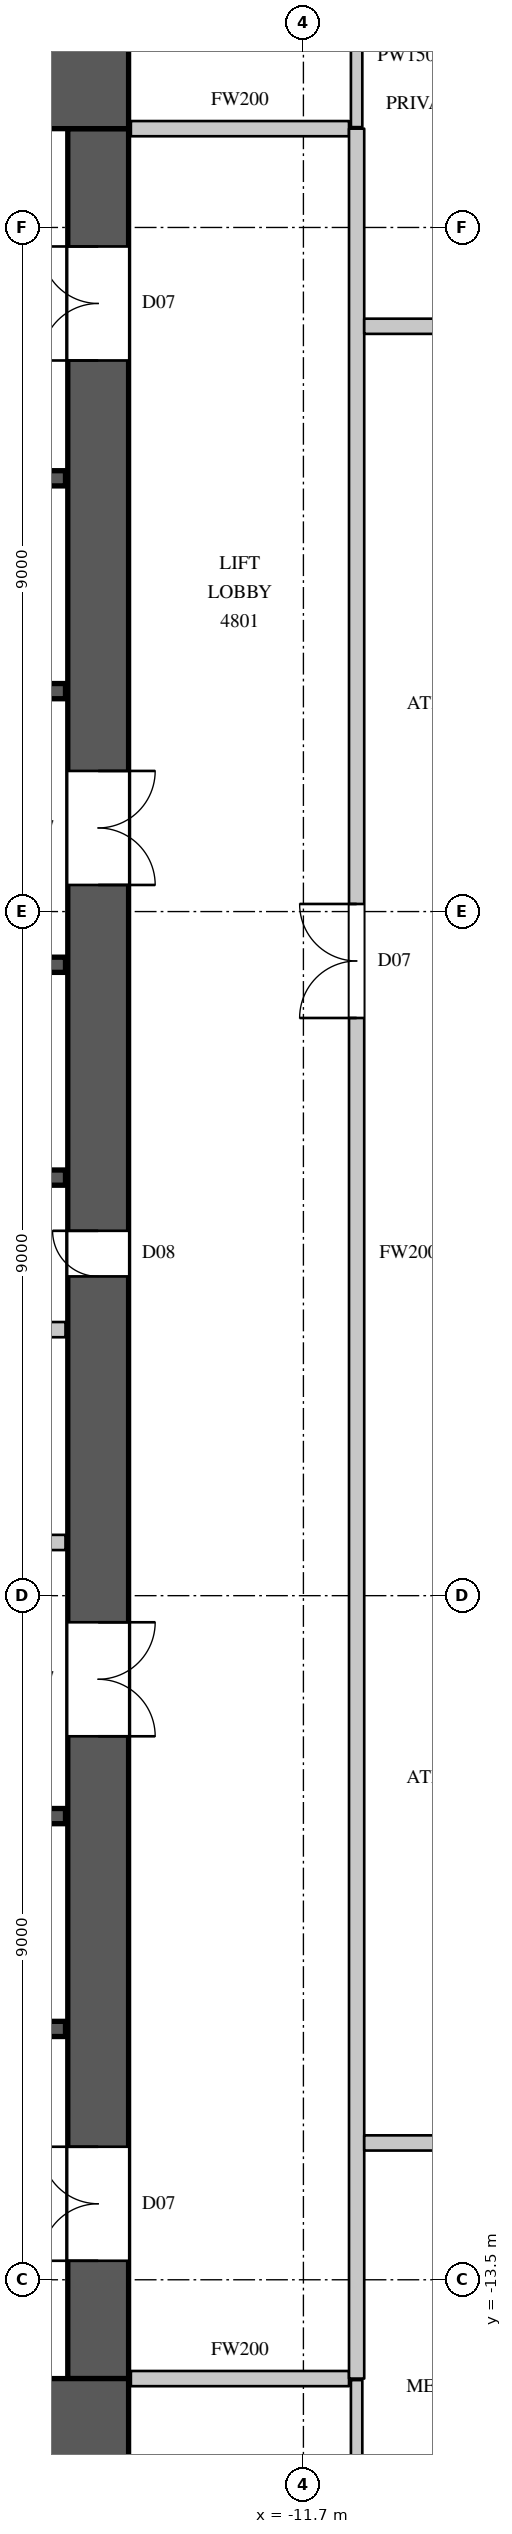
"""IFC4 building model, lengths in metres.
Left out: names, types, materials, properties, quantities, classifications, styles, units other than length and angle.
Written with IfcOpenShell. Run it as: python <this file> out.ifc"""

import sys

from ifc_helpers import new_model, si_unit, direction, frame, frame_2d, origin, place, context, subcontext, project, spatial, rectangle, extrude, element, fill, save


model = new_model("IFC4")
c1 = context("Model", 3, precision=1e-05, world=origin(), true_north=direction((0.0, 1.0)))
c2 = subcontext(c1, "Body", "Model", "MODEL_VIEW")
j1 = project(units=[si_unit("LENGTHUNIT", "METRE"), si_unit("PLANEANGLEUNIT", "RADIAN")], contexts=[c1])
p1 = place(None, origin())
s1 = spatial("IfcSite", under=j1, at=p1, CompositionType="ELEMENT")
p2 = place(p1, origin())
s2 = spatial("IfcBuilding", under=s1, at=p2, CompositionType="ELEMENT")
p3 = place(p2, frame((0.0, 0.0, 217.9)))
s3 = spatial("IfcBuildingStorey", under=s2, at=p3, CompositionType="ELEMENT", Elevation=217.9)
for number, where, z_axis, x_axis in (
    (1, (-30.0, 15.4, 0.0), (0.0, 0.0, 1.0), (1.0, 0.0, 0.0)),
    (2, (-30.0, -15.4, 0.0), (0.0, 0.0, 1.0), (1.0, 0.0, 0.0)),
):
    element("IfcWall", number, at=place(p3, frame(where, z_axis=z_axis, x_axis=x_axis)), inside=s3, PredefinedType="SHEAR", context=c2, shape_type="SweptSolid", body=[
        extrude(rectangle(XDim=16.0, YDim=1.2, at=frame_2d((8.0, 0.0))), origin(), (0.0, 0.0, 1.0), 4.1),
    ])
p4 = place(p3, frame((-14.4, -14.8, 0.0), z_axis=(0.0, 0.0, 1.0), x_axis=(0.0, 1.0, 0.0)))
e3 = element("IfcWall", 3, at=p4, inside=s3, PredefinedType="SHEAR", context=c2, shape_type="SweptSolid", body=[
    extrude(rectangle(XDim=29.6, YDim=0.8, at=frame_2d((14.8, 0.0))), origin(), (0.0, 0.0, 1.0), 4.1),
])
p5 = place(p4, frame((1.55, 0.0, 0.0)))
e4 = element("IfcOpeningElement", 4, at=p5, cuts=e3, PredefinedType="OPENING", context=c2, shape_type="SweptSolid", body=[
    extrude(rectangle(XDim=1.5, YDim=2.4, at=frame_2d((0.75, 1.2))), frame((0.0, 0.41, 0.0), z_axis=(0.0, -1.0, 0.0), x_axis=(1.0, 0.0, 0.0)), (0.0, 0.0, 1.0), 0.82),
])
p6 = place(p4, frame((26.55, 0.0, 0.0)))
e5 = element("IfcOpeningElement", 5, at=p6, cuts=e3, PredefinedType="OPENING", context=c2, shape_type="SweptSolid", body=[
    extrude(rectangle(XDim=1.5, YDim=2.4, at=frame_2d((0.75, 1.2))), frame((0.0, 0.41, 0.0), z_axis=(0.0, -1.0, 0.0), x_axis=(1.0, 0.0, 0.0)), (0.0, 0.0, 1.0), 0.82),
])
p7 = place(p4, frame((8.45, 0.0, 0.0)))
e6 = element("IfcOpeningElement", 6, at=p7, cuts=e3, PredefinedType="OPENING", context=c2, shape_type="SweptSolid", body=[
    extrude(rectangle(XDim=1.5, YDim=2.4, at=frame_2d((0.75, 1.2))), frame((0.0, 0.41, 0.0), z_axis=(0.0, -1.0, 0.0), x_axis=(1.0, 0.0, 0.0)), (0.0, 0.0, 1.0), 0.82),
])
p8 = place(p4, frame((19.65, 0.0, 0.0)))
e7 = element("IfcOpeningElement", 7, at=p8, cuts=e3, PredefinedType="OPENING", context=c2, shape_type="SweptSolid", body=[
    extrude(rectangle(XDim=1.5, YDim=2.4, at=frame_2d((0.75, 1.2))), frame((0.0, 0.41, 0.0), z_axis=(0.0, -1.0, 0.0), x_axis=(1.0, 0.0, 0.0)), (0.0, 0.0, 1.0), 0.82),
])
p9 = place(p4, frame((14.5, 0.0, 0.0)))
e8 = element("IfcOpeningElement", 8, at=p9, cuts=e3, PredefinedType="OPENING", context=c2, shape_type="SweptSolid", body=[
    extrude(rectangle(XDim=0.6, YDim=2.0, at=frame_2d((0.3, 1.0))), frame((0.0, 0.41, 0.0), z_axis=(0.0, -1.0, 0.0), x_axis=(1.0, 0.0, 0.0)), (0.0, 0.0, 1.0), 0.82),
])
p10 = place(p3, frame((-29.17, -3.8, 0.0), z_axis=(0.0, 0.0, 1.0), x_axis=(1.0, 0.0, 0.0)))
e9 = element("IfcWall", 9, at=p10, inside=s3, PredefinedType="PARTITIONING", context=c2, shape_type="SweptSolid", body=[
    extrude(rectangle(XDim=14.34, YDim=0.2, at=frame_2d((7.17, 0.0))), origin(), (0.0, 0.0, 1.0), 3.8),
])
p11 = place(p10, frame((3.6, 0.0, 0.0)))
e10 = element("IfcOpeningElement", 10, at=p11, cuts=e9, PredefinedType="OPENING", context=c2, shape_type="SweptSolid", body=[
    extrude(rectangle(XDim=0.9, YDim=2.2, at=frame_2d((0.45, 1.1))), frame((0.0, 0.11, 0.0), z_axis=(0.0, -1.0, 0.0), x_axis=(1.0, 0.0, 0.0)), (0.0, 0.0, 1.0), 0.22),
])
p12 = place(p10, frame((10.6, 0.0, 0.0)))
e11 = element("IfcOpeningElement", 11, at=p12, cuts=e9, PredefinedType="OPENING", context=c2, shape_type="SweptSolid", body=[
    extrude(rectangle(XDim=0.9, YDim=2.2, at=frame_2d((0.45, 1.1))), frame((0.0, 0.11, 0.0), z_axis=(0.0, -1.0, 0.0), x_axis=(1.0, 0.0, 0.0)), (0.0, 0.0, 1.0), 0.22),
])
for number, where, z_axis, x_axis in (
    (12, (-13.97, -14.8, 0.0), (0.0, 0.0, 1.0), (1.0, 0.0, 0.0)),
    (13, (-13.97, 14.8, 0.0), (0.0, 0.0, 1.0), (1.0, 0.0, 0.0)),
):
    element("IfcWall", number, at=place(p3, frame(where, z_axis=z_axis, x_axis=x_axis)), inside=s3, PredefinedType="PARTITIONING", context=c2, shape_type="SweptSolid", body=[
        extrude(rectangle(XDim=2.87, YDim=0.2, at=frame_2d((1.435, 0.0))), origin(), (0.0, 0.0, 1.0), 3.8),
    ])
p13 = place(p3, frame((-11.0, -14.8, 0.0), z_axis=(0.0, 0.0, 1.0), x_axis=(0.0, 1.0, 0.0)))
e14 = element("IfcWall", 14, at=p13, inside=s3, PredefinedType="PARTITIONING", context=c2, shape_type="SweptSolid", body=[
    extrude(rectangle(XDim=29.6, YDim=0.2, at=frame_2d((14.8, 0.0))), origin(), (0.0, 0.0, 1.0), 3.8),
])
p14 = place(p13, frame((17.9, 0.0, 0.0)))
e15 = element("IfcOpeningElement", 15, at=p14, cuts=e14, PredefinedType="OPENING", context=c2, shape_type="SweptSolid", body=[
    extrude(rectangle(XDim=1.5, YDim=2.4, at=frame_2d((0.75, 1.2))), frame((0.0, 0.11, 0.0), z_axis=(0.0, -1.0, 0.0), x_axis=(1.0, 0.0, 0.0)), (0.0, 0.0, 1.0), 0.22),
])
p15 = place(p3, frame((-10.9, -11.7, 0.0), z_axis=(0.0, 0.0, 1.0), x_axis=(1.0, 0.0, 0.0)))
e16 = element("IfcWall", 16, at=p15, inside=s3, PredefinedType="PARTITIONING", context=c2, shape_type="SweptSolid", body=[
    extrude(rectangle(XDim=21.5, YDim=0.2, at=frame_2d((10.75, 0.0))), origin(), (0.0, 0.0, 1.0), 3.8),
])
p16 = place(p15, frame((13.2, 0.0, 0.0)))
e17 = element("IfcOpeningElement", 17, at=p16, cuts=e16, PredefinedType="OPENING", context=c2, shape_type="SweptSolid", body=[
    extrude(rectangle(XDim=0.9, YDim=2.2, at=frame_2d((0.45, 1.1))), frame((0.0, 0.11, 0.0), z_axis=(0.0, -1.0, 0.0), x_axis=(1.0, 0.0, 0.0)), (0.0, 0.0, 1.0), 0.22),
])
p17 = place(p15, frame((16.5, 0.0, 0.0)))
e18 = element("IfcOpeningElement", 18, at=p17, cuts=e16, PredefinedType="OPENING", context=c2, shape_type="SweptSolid", body=[
    extrude(rectangle(XDim=0.9, YDim=2.2, at=frame_2d((0.45, 1.1))), frame((0.0, 0.11, 0.0), z_axis=(0.0, -1.0, 0.0), x_axis=(1.0, 0.0, 0.0)), (0.0, 0.0, 1.0), 0.22),
])
p18 = place(p15, frame((20.25, 0.0, 0.0)))
e19 = element("IfcOpeningElement", 19, at=p18, cuts=e16, PredefinedType="OPENING", context=c2, shape_type="SweptSolid", body=[
    extrude(rectangle(XDim=0.9, YDim=2.2, at=frame_2d((0.45, 1.1))), frame((0.0, 0.11, 0.0), z_axis=(0.0, -1.0, 0.0), x_axis=(1.0, 0.0, 0.0)), (0.0, 0.0, 1.0), 0.22),
])
p19 = place(p15, frame((1.25, 0.0, 0.0)))
e20 = element("IfcOpeningElement", 20, at=p19, cuts=e16, PredefinedType="OPENING", context=c2, shape_type="SweptSolid", body=[
    extrude(rectangle(XDim=1.1, YDim=2.4, at=frame_2d((0.55, 1.2))), frame((0.0, 0.11, 0.0), z_axis=(0.0, -1.0, 0.0), x_axis=(1.0, 0.0, 0.0)), (0.0, 0.0, 1.0), 0.22),
])
p20 = place(p15, frame((7.3, 0.0, 0.0)))
e21 = element("IfcOpeningElement", 21, at=p20, cuts=e16, PredefinedType="OPENING", context=c2, shape_type="SweptSolid", body=[
    extrude(rectangle(XDim=1.1, YDim=2.4, at=frame_2d((0.55, 1.2))), frame((0.0, 0.11, 0.0), z_axis=(0.0, -1.0, 0.0), x_axis=(1.0, 0.0, 0.0)), (0.0, 0.0, 1.0), 0.22),
])
p21 = place(p3, frame((-10.9, 12.2, 0.0), z_axis=(0.0, 0.0, 1.0), x_axis=(1.0, 0.0, 0.0)))
e22 = element("IfcWall", 22, at=p21, inside=s3, PredefinedType="PARTITIONING", context=c2, shape_type="SweptSolid", body=[
    extrude(rectangle(XDim=3.704, YDim=0.2, at=frame_2d((1.852, 0.0))), origin(), (0.0, 0.0, 1.0), 3.8),
])
p22 = place(p21, frame((1.7, 0.0, 0.0)))
e23 = element("IfcOpeningElement", 23, at=p22, cuts=e22, PredefinedType="OPENING", context=c2, shape_type="SweptSolid", body=[
    extrude(rectangle(XDim=1.1, YDim=2.4, at=frame_2d((0.55, 1.2))), frame((0.0, 0.11, 0.0), z_axis=(0.0, -1.0, 0.0), x_axis=(1.0, 0.0, 0.0)), (0.0, 0.0, 1.0), 0.22),
])
for number, where, z_axis, x_axis in (
    (24, (-11.0, -16.7, 0.0), (0.0, 0.0, 1.0), (0.0, 1.0, 0.0)),
    (25, (-11.0, 14.82, 0.0), (0.0, 0.0, 1.0), (0.0, 1.0, 0.0)),
):
    element("IfcWall", number, at=place(p3, frame(where, z_axis=z_axis, x_axis=x_axis)), inside=s3, PredefinedType="PARTITIONING", context=c2, shape_type="SweptSolid", body=[
        extrude(rectangle(XDim=1.88, YDim=0.15, at=frame_2d((0.94, 0.0))), origin(), (0.0, 0.0, 1.0), 3.8),
    ])
p23 = place(p3, frame((-29.17, -1.0, 0.0), z_axis=(0.0, 0.0, 1.0), x_axis=(1.0, 0.0, 0.0)))
e26 = element("IfcWall", 26, at=p23, inside=s3, PredefinedType="PARTITIONING", context=c2, shape_type="SweptSolid", body=[
    extrude(rectangle(XDim=14.34, YDim=0.2, at=frame_2d((7.17, 0.0))), origin(), (0.0, 0.0, 1.0), 3.8),
])
p24 = place(p3, frame((-26.08, 1.0, 0.0), z_axis=(0.0, 0.0, 1.0), x_axis=(1.0, 0.0, 0.0)))
e27 = element("IfcWall", 27, at=p24, inside=s3, PredefinedType="SHEAR", context=c2, shape_type="SweptSolid", body=[
    extrude(rectangle(XDim=11.25, YDim=0.2, at=frame_2d((5.625, 0.0))), origin(), (0.0, 0.0, 1.0), 3.8),
])
p25 = place(p3, frame((-26.08, 3.8, 0.0), z_axis=(0.0, 0.0, 1.0), x_axis=(1.0, 0.0, 0.0)))
e28 = element("IfcWall", 28, at=p25, inside=s3, PredefinedType="SHEAR", context=c2, shape_type="SweptSolid", body=[
    extrude(rectangle(XDim=11.25, YDim=0.2, at=frame_2d((5.625, 0.0))), origin(), (0.0, 0.0, 1.0), 3.8),
])
p26 = place(p25, frame((0.8, 0.0, 0.0)))
e29 = element("IfcOpeningElement", 29, at=p26, cuts=e28, PredefinedType="OPENING", context=c2, shape_type="SweptSolid", body=[
    extrude(rectangle(XDim=1.1, YDim=2.2, at=frame_2d((0.55, 1.1))), frame((0.0, 0.11, 0.0), z_axis=(0.0, -1.0, 0.0), x_axis=(1.0, 0.0, 0.0)), (0.0, 0.0, 1.0), 0.22),
])
p27 = place(p25, frame((3.55, 0.0, 0.0)))
e30 = element("IfcOpeningElement", 30, at=p27, cuts=e28, PredefinedType="OPENING", context=c2, shape_type="SweptSolid", body=[
    extrude(rectangle(XDim=1.1, YDim=2.2, at=frame_2d((0.55, 1.1))), frame((0.0, 0.11, 0.0), z_axis=(0.0, -1.0, 0.0), x_axis=(1.0, 0.0, 0.0)), (0.0, 0.0, 1.0), 0.22),
])
p28 = place(p25, frame((6.25, 0.0, 0.0)))
e31 = element("IfcOpeningElement", 31, at=p28, cuts=e28, PredefinedType="OPENING", context=c2, shape_type="SweptSolid", body=[
    extrude(rectangle(XDim=1.1, YDim=2.2, at=frame_2d((0.55, 1.1))), frame((0.0, 0.11, 0.0), z_axis=(0.0, -1.0, 0.0), x_axis=(1.0, 0.0, 0.0)), (0.0, 0.0, 1.0), 0.22),
])
p29 = place(p25, frame((9.15, 0.0, 0.0)))
e32 = element("IfcOpeningElement", 32, at=p29, cuts=e28, PredefinedType="OPENING", context=c2, shape_type="SweptSolid", body=[
    extrude(rectangle(XDim=1.1, YDim=2.2, at=frame_2d((0.55, 1.1))), frame((0.0, 0.11, 0.0), z_axis=(0.0, -1.0, 0.0), x_axis=(1.0, 0.0, 0.0)), (0.0, 0.0, 1.0), 0.22),
])
p30 = place(p3, frame((-17.92, -10.2, 0.0), z_axis=(0.0, 0.0, 1.0), x_axis=(1.0, 0.0, 0.0)))
e33 = element("IfcWall", 33, at=p30, inside=s3, PredefinedType="SHEAR", context=c2, shape_type="SweptSolid", body=[
    extrude(rectangle(XDim=3.09, YDim=0.2, at=frame_2d((1.545, 0.0))), origin(), (0.0, 0.0, 1.0), 3.8),
])
p31 = place(p30, frame((1.0, 0.0, 0.0)))
e34 = element("IfcOpeningElement", 34, at=p31, cuts=e33, PredefinedType="OPENING", context=c2, shape_type="SweptSolid", body=[
    extrude(rectangle(XDim=1.1, YDim=2.2, at=frame_2d((0.55, 1.1))), frame((0.0, 0.11, 0.0), z_axis=(0.0, -1.0, 0.0), x_axis=(1.0, 0.0, 0.0)), (0.0, 0.0, 1.0), 0.22),
])
p32 = place(p3, frame((-17.9, -7.4, 0.0), z_axis=(0.0, 0.0, 1.0), x_axis=(1.0, 0.0, 0.0)))
e35 = element("IfcWall", 35, at=p32, inside=s3, PredefinedType="SHEAR", context=c2, shape_type="SweptSolid", body=[
    extrude(rectangle(XDim=3.07, YDim=0.2, at=frame_2d((1.535, 0.0))), origin(), (0.0, 0.0, 1.0), 3.8),
])
p33 = place(p3, frame((-17.92, 7.4, 0.0), z_axis=(0.0, 0.0, 1.0), x_axis=(1.0, 0.0, 0.0)))
e36 = element("IfcWall", 36, at=p33, inside=s3, PredefinedType="SHEAR", context=c2, shape_type="SweptSolid", body=[
    extrude(rectangle(XDim=3.09, YDim=0.2, at=frame_2d((1.545, 0.0))), origin(), (0.0, 0.0, 1.0), 3.8),
])
p34 = place(p3, frame((-17.92, 10.2, 0.0), z_axis=(0.0, 0.0, 1.0), x_axis=(1.0, 0.0, 0.0)))
e37 = element("IfcWall", 37, at=p34, inside=s3, PredefinedType="SHEAR", context=c2, shape_type="SweptSolid", body=[
    extrude(rectangle(XDim=3.09, YDim=0.2, at=frame_2d((1.545, 0.0))), origin(), (0.0, 0.0, 1.0), 3.8),
])
p35 = place(p34, frame((1.0, 0.0, 0.0)))
e38 = element("IfcOpeningElement", 38, at=p35, cuts=e37, PredefinedType="OPENING", context=c2, shape_type="SweptSolid", body=[
    extrude(rectangle(XDim=1.1, YDim=2.2, at=frame_2d((0.55, 1.1))), frame((0.0, 0.11, 0.0), z_axis=(0.0, -1.0, 0.0), x_axis=(1.0, 0.0, 0.0)), (0.0, 0.0, 1.0), 0.22),
])
p36 = place(p14, origin())
e39 = element("IfcDoor", 39, at=p36, inside=s3, OperationType="DOUBLE_DOOR_SINGLE_SWING", PredefinedType="DOOR", context=c2, shape_type="SweptSolid", body=[
    extrude(rectangle(XDim=1.5, YDim=2.4, at=frame_2d((0.75, 1.2))), frame((0.0, 0.025, 0.0), z_axis=(0.0, -1.0, 0.0), x_axis=(1.0, 0.0, 0.0)), (0.0, 0.0, 1.0), 0.05),
])
fill(e15, e39)
p37 = place(p5, origin())
e40 = element("IfcDoor", 40, at=p37, inside=s3, OperationType="DOUBLE_DOOR_SINGLE_SWING", PredefinedType="DOOR", context=c2, shape_type="SweptSolid", body=[
    extrude(rectangle(XDim=1.5, YDim=2.4, at=frame_2d((0.75, 1.2))), frame((0.0, 0.395, 0.0), z_axis=(0.0, -1.0, 0.0), x_axis=(1.0, 0.0, 0.0)), (0.0, 0.0, 1.0), 0.05),
])
fill(e4, e40)
p38 = place(p6, origin())
e41 = element("IfcDoor", 41, at=p38, inside=s3, OperationType="DOUBLE_DOOR_SINGLE_SWING", PredefinedType="DOOR", context=c2, shape_type="SweptSolid", body=[
    extrude(rectangle(XDim=1.5, YDim=2.4, at=frame_2d((0.75, 1.2))), frame((0.0, 0.395, 0.0), z_axis=(0.0, -1.0, 0.0), x_axis=(1.0, 0.0, 0.0)), (0.0, 0.0, 1.0), 0.05),
])
fill(e5, e41)
p39 = place(p7, origin())
e42 = element("IfcDoor", 42, at=p39, inside=s3, OperationType="DOUBLE_DOOR_SINGLE_SWING", PredefinedType="DOOR", context=c2, shape_type="SweptSolid", body=[
    extrude(rectangle(XDim=1.5, YDim=2.4, at=frame_2d((0.75, 1.2))), frame((0.0, -0.345, 0.0), z_axis=(0.0, -1.0, 0.0), x_axis=(1.0, 0.0, 0.0)), (0.0, 0.0, 1.0), 0.05),
])
fill(e6, e42)
p40 = place(p8, origin())
e43 = element("IfcDoor", 43, at=p40, inside=s3, OperationType="DOUBLE_DOOR_SINGLE_SWING", PredefinedType="DOOR", context=c2, shape_type="SweptSolid", body=[
    extrude(rectangle(XDim=1.5, YDim=2.4, at=frame_2d((0.75, 1.2))), frame((0.0, -0.345, 0.0), z_axis=(0.0, -1.0, 0.0), x_axis=(1.0, 0.0, 0.0)), (0.0, 0.0, 1.0), 0.05),
])
fill(e7, e43)
p41 = place(p9, origin())
e44 = element("IfcDoor", 44, at=p41, inside=s3, OperationType="SINGLE_SWING_RIGHT", PredefinedType="DOOR", context=c2, shape_type="SweptSolid", body=[
    extrude(rectangle(XDim=0.6, YDim=2.0, at=frame_2d((0.3, 1.0))), frame((0.0, 0.395, 0.0), z_axis=(0.0, -1.0, 0.0), x_axis=(1.0, 0.0, 0.0)), (0.0, 0.0, 1.0), 0.05),
])
fill(e8, e44)
save(model, sys.argv[1])
